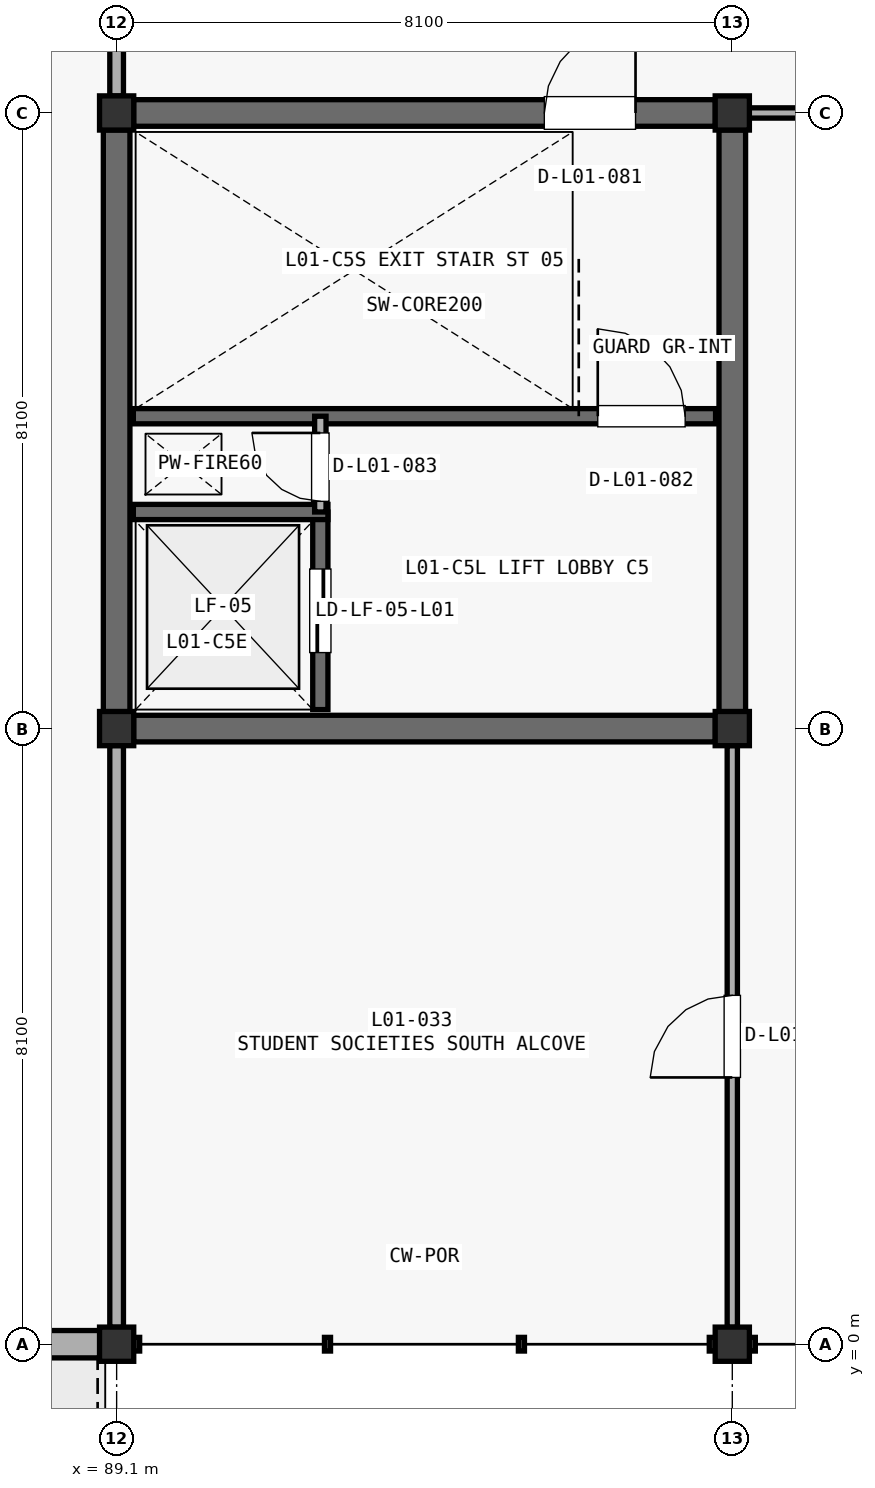
"""IFC4 building model, lengths in metres.
Left out: names, types, materials, properties, quantities, classifications, styles, units other than length and angle.
Written with IfcOpenShell. Run it as: python <this file> out.ifc"""

import sys

from ifc_helpers import new_model, si_unit, direction, frame, frame_2d, origin, origin_2d, place, context, subcontext, project, spatial, rectangle, extrude, element, fill, save


model = new_model("IFC4")
c1 = context("Model", 3, precision=1e-05, world=origin(), true_north=direction((0.0, 1.0)))
c2 = subcontext(c1, "Body", "Model", "MODEL_VIEW")
j1 = project(units=[si_unit("LENGTHUNIT", "METRE"), si_unit("PLANEANGLEUNIT", "RADIAN")], contexts=[c1])
p1 = place(None, origin())
s1 = spatial("IfcSite", under=j1, at=p1, CompositionType="ELEMENT")
p2 = place(p1, origin())
s2 = spatial("IfcBuilding", under=s1, at=p2, CompositionType="ELEMENT")
p3 = place(p2, frame((0.0, 0.0, 5.1)))
s3 = spatial("IfcBuildingStorey", under=s2, at=p3, CompositionType="ELEMENT", Elevation=5.1)
for number, where, z_axis, x_axis in (
    (1, (89.1, 0.0, 0.0), (0.0, 0.0, 1.0), (1.0, 0.0, 0.0)),
    (2, (89.1, 8.1, 0.0), (0.0, 0.0, 1.0), (1.0, 0.0, 0.0)),
    (3, (89.1, 16.2, 0.0), (0.0, 0.0, 1.0), (1.0, 0.0, 0.0)),
    (4, (97.2, 0.0, 0.0), (0.0, 0.0, 1.0), (1.0, 0.0, 0.0)),
    (5, (97.2, 8.1, 0.0), (0.0, 0.0, 1.0), (1.0, 0.0, 0.0)),
    (6, (97.2, 16.2, 0.0), (0.0, 0.0, 1.0), (1.0, 0.0, 0.0)),
):
    element("IfcColumn", number, at=place(p3, frame(where, z_axis=z_axis, x_axis=x_axis)), inside=s3, PredefinedType="COLUMN", context=c2, shape_type="SweptSolid", body=[
        extrude(rectangle(XDim=0.45, YDim=0.45, at=origin_2d()), origin(), (0.0, 0.0, 1.0), 4.59),
    ])
p4 = place(p3, frame((81.298, 0.0, 0.0), z_axis=(0.0, 0.0, 1.0), x_axis=(1.0, 0.0, 0.0)))
e7 = element("IfcWall", 7, at=p4, inside=s3, PredefinedType="STANDARD", context=c2, shape_type="SweptSolid", body=[
    extrude(rectangle(XDim=7.579, YDim=0.36, at=frame_2d((3.79, 0.0))), origin(), (0.0, 0.0, 1.0), 3.849),
])
p5 = place(p4, frame((4.689, 0.0, 0.0), z_axis=(0.0, 0.0, 1.0), x_axis=(-1.0, 0.0, 0.0)))
e8 = element("IfcOpeningElement", 8, at=p5, cuts=e7, PredefinedType="OPENING", context=c2, shape_type="SweptSolid", body=[
    extrude(rectangle(XDim=1.8, YDim=2.2, at=frame_2d((0.9, 1.1))), frame((0.0, 0.19, 0.0), z_axis=(0.0, -1.0, 0.0), x_axis=(1.0, 0.0, 0.0)), (0.0, 0.0, 1.0), 0.38),
])
p6 = place(p3, frame((89.323, 16.2, 0.0), z_axis=(0.0, 0.0, 1.0), x_axis=(1.0, 0.0, 0.0)))
e9 = element("IfcWall", 9, at=p6, inside=s3, PredefinedType="SHEAR", context=c2, shape_type="SweptSolid", body=[
    extrude(rectangle(XDim=7.654, YDim=0.35, at=frame_2d((3.827, 0.0))), origin(), (0.0, 0.0, 1.0), 4.312),
])
p7 = place(p6, frame((5.404, 0.0, 0.0)))
e10 = element("IfcOpeningElement", 10, at=p7, cuts=e9, PredefinedType="OPENING", context=c2, shape_type="SweptSolid", body=[
    extrude(rectangle(XDim=1.2, YDim=2.2, at=frame_2d((0.6, 1.1))), frame((0.0, 0.185, 0.0), z_axis=(0.0, -1.0, 0.0), x_axis=(1.0, 0.0, 0.0)), (0.0, 0.0, 1.0), 0.37),
])
for number, where, z_axis, x_axis in (
    (11, (89.1, 8.323, 0.0), (0.0, 0.0, 1.0), (0.0, 1.0, 0.0)),
    (12, (97.2, 8.323, 0.0), (0.0, 0.0, 1.0), (0.0, 1.0, 0.0)),
    (13, (89.323, 8.1, 0.0), (0.0, 0.0, 1.0), (1.0, 0.0, 0.0)),
):
    element("IfcWall", number, at=place(p3, frame(where, z_axis=z_axis, x_axis=x_axis)), inside=s3, PredefinedType="SHEAR", context=c2, shape_type="SweptSolid", body=[
        extrude(rectangle(XDim=7.654, YDim=0.35, at=frame_2d((3.827, 0.0))), origin(), (0.0, 0.0, 1.0), 4.312),
    ])
p8 = place(p3, frame((89.32, 12.21, 0.0), z_axis=(0.0, 0.0, 1.0), x_axis=(1.0, 0.0, 0.0)))
e14 = element("IfcWall", 14, at=p8, inside=s3, PredefinedType="SHEAR", context=c2, shape_type="SweptSolid", body=[
    extrude(rectangle(XDim=7.66, YDim=0.2, at=frame_2d((3.83, 0.0))), origin(), (0.0, 0.0, 1.0), 4.312),
])
p9 = place(p8, frame((6.11, 0.0, 0.0)))
e15 = element("IfcOpeningElement", 15, at=p9, cuts=e14, PredefinedType="OPENING", context=c2, shape_type="SweptSolid", body=[
    extrude(rectangle(XDim=1.15, YDim=2.2, at=frame_2d((0.575, 1.1))), frame((0.0, 0.11, 0.0), z_axis=(0.0, -1.0, 0.0), x_axis=(1.0, 0.0, 0.0)), (0.0, 0.0, 1.0), 0.22),
])
p10 = place(p3, frame((91.78, 8.35, 0.0), z_axis=(0.0, 0.0, 1.0), x_axis=(0.0, 1.0, 0.0)))
e16 = element("IfcWall", 16, at=p10, inside=s3, PredefinedType="SHEAR", context=c2, shape_type="SweptSolid", body=[
    extrude(rectangle(XDim=2.6, YDim=0.2, at=frame_2d((1.3, 0.0))), origin(), (0.0, 0.0, 1.0), 4.312),
])
p11 = place(p10, frame((0.75, 0.0, 0.0)))
e17 = element("IfcOpeningElement", 17, at=p11, cuts=e16, PredefinedType="OPENING", context=c2, shape_type="SweptSolid", body=[
    extrude(rectangle(XDim=1.1, YDim=2.2, at=frame_2d((0.55, 1.1))), frame((0.0, 0.11, 0.0), z_axis=(0.0, -1.0, 0.0), x_axis=(1.0, 0.0, 0.0)), (0.0, 0.0, 1.0), 0.22),
])
p12 = place(p3, frame((89.32, 10.95, 0.0), z_axis=(0.0, 0.0, 1.0), x_axis=(1.0, 0.0, 0.0)))
e18 = element("IfcWall", 18, at=p12, inside=s3, PredefinedType="SHEAR", context=c2, shape_type="SweptSolid", body=[
    extrude(rectangle(XDim=2.56, YDim=0.2, at=frame_2d((1.28, 0.0))), origin(), (0.0, 0.0, 1.0), 4.312),
])
p13 = place(p3, frame((91.78, 10.95, 0.0), z_axis=(0.0, 0.0, 1.0), x_axis=(0.0, 1.0, 0.0)))
e19 = element("IfcWall", 19, at=p13, inside=s3, PredefinedType="PARTITIONING", context=c2, shape_type="SweptSolid", body=[
    extrude(rectangle(XDim=1.26, YDim=0.15, at=frame_2d((0.63, 0.0))), origin(), (0.0, 0.0, 1.0), 4.312),
])
p14 = place(p13, frame((0.14, 0.0, 0.0)))
e20 = element("IfcOpeningElement", 20, at=p14, cuts=e19, PredefinedType="OPENING", context=c2, shape_type="SweptSolid", body=[
    extrude(rectangle(XDim=0.9, YDim=2.15, at=frame_2d((0.45, 1.075))), frame((0.0, 0.085, 0.0), z_axis=(0.0, -1.0, 0.0), x_axis=(1.0, 0.0, 0.0)), (0.0, 0.0, 1.0), 0.17),
])
p15 = place(p3, frame((97.423, 16.2, 0.0), z_axis=(0.0, 0.0, 1.0), x_axis=(1.0, 0.0, 0.0)))
e21 = element("IfcWall", 21, at=p15, inside=s3, PredefinedType="PARTITIONING", context=c2, shape_type="SweptSolid", body=[
    extrude(rectangle(XDim=7.579, YDim=0.135, at=frame_2d((3.79, 0.0))), origin(), (0.0, 0.0, 1.0), 4.006),
])
p16 = place(p15, frame((3.314, 0.0, 0.0)))
e22 = element("IfcOpeningElement", 22, at=p16, cuts=e21, PredefinedType="OPENING", context=c2, shape_type="SweptSolid", body=[
    extrude(rectangle(XDim=0.95, YDim=2.15, at=frame_2d((0.475, 1.075))), frame((0.0, 0.078, 0.0), z_axis=(0.0, -1.0, 0.0), x_axis=(1.0, 0.0, 0.0)), (0.0, 0.0, 1.0), 0.155),
])
p17 = place(p3, frame((97.2, 0.223, 0.0), z_axis=(0.0, 0.0, 1.0), x_axis=(0.0, 1.0, 0.0)))
e23 = element("IfcWall", 23, at=p17, inside=s3, PredefinedType="PARTITIONING", context=c2, shape_type="SweptSolid", body=[
    extrude(rectangle(XDim=7.654, YDim=0.135, at=frame_2d((3.827, 0.0))), origin(), (0.0, 0.0, 1.0), 3.902),
])
p18 = place(p17, frame((3.287, 0.0, 0.0)))
e24 = element("IfcOpeningElement", 24, at=p18, cuts=e23, PredefinedType="OPENING", context=c2, shape_type="SweptSolid", body=[
    extrude(rectangle(XDim=1.08, YDim=2.15, at=frame_2d((0.54, 1.075))), frame((0.0, 0.078, 0.0), z_axis=(0.0, -1.0, 0.0), x_axis=(1.0, 0.0, 0.0)), (0.0, 0.0, 1.0), 0.155),
])
p19 = place(p3, frame((89.1, 0.223, 0.0), z_axis=(0.0, 0.0, 1.0), x_axis=(0.0, 1.0, 0.0)))
e25 = element("IfcWall", 25, at=p19, inside=s3, PredefinedType="PARTITIONING", context=c2, shape_type="SweptSolid", body=[
    extrude(rectangle(XDim=7.654, YDim=0.18, at=frame_2d((3.827, 0.0))), origin(), (0.0, 0.0, 1.0), 3.852),
])
p20 = place(p3, frame((89.1, 16.423, 0.0), z_axis=(0.0, 0.0, 1.0), x_axis=(0.0, 1.0, 0.0)))
e26 = element("IfcWall", 26, at=p20, inside=s3, PredefinedType="PARTITIONING", context=c2, shape_type="SweptSolid", body=[
    extrude(rectangle(XDim=7.654, YDim=0.18, at=frame_2d((3.827, 0.0))), origin(), (0.0, 0.0, 1.0), 3.954),
])
p21 = place(p7, origin())
e27 = element("IfcDoor", 27, at=p21, inside=s3, OperationType="SINGLE_SWING_RIGHT", PredefinedType="DOOR", context=c2, shape_type="SweptSolid", body=[
    extrude(rectangle(XDim=1.2, YDim=2.2, at=frame_2d((0.6, 1.1))), frame((0.0, 0.025, 0.0), z_axis=(0.0, -1.0, 0.0), x_axis=(1.0, 0.0, 0.0)), (0.0, 0.0, 1.0), 0.05),
])
fill(e10, e27)
p22 = place(p9, origin())
e28 = element("IfcDoor", 28, at=p22, inside=s3, OperationType="SINGLE_SWING_LEFT", PredefinedType="DOOR", context=c2, shape_type="SweptSolid", body=[
    extrude(rectangle(XDim=1.15, YDim=2.2, at=frame_2d((0.575, 1.1))), frame((0.0, 0.025, 0.0), z_axis=(0.0, -1.0, 0.0), x_axis=(1.0, 0.0, 0.0)), (0.0, 0.0, 1.0), 0.05),
])
fill(e15, e28)
p23 = place(p11, origin())
e29 = element("IfcDoor", 29, at=p23, inside=s3, OperationType="SLIDING_TO_LEFT", PredefinedType="DOOR", context=c2, shape_type="SweptSolid", body=[
    extrude(rectangle(XDim=1.1, YDim=2.2, at=frame_2d((0.55, 1.1))), frame((0.0, 0.025, 0.0), z_axis=(0.0, -1.0, 0.0), x_axis=(1.0, 0.0, 0.0)), (0.0, 0.0, 1.0), 0.05),
])
fill(e17, e29)
p24 = place(p14, origin())
e30 = element("IfcDoor", 30, at=p24, inside=s3, OperationType="SINGLE_SWING_RIGHT", PredefinedType="DOOR", context=c2, shape_type="SweptSolid", body=[
    extrude(rectangle(XDim=0.9, YDim=2.15, at=frame_2d((0.45, 1.075))), frame((0.0, 0.025, 0.0), z_axis=(0.0, -1.0, 0.0), x_axis=(1.0, 0.0, 0.0)), (0.0, 0.0, 1.0), 0.05),
])
fill(e20, e30)
p25 = place(p18, origin())
e31 = element("IfcDoor", 31, at=p25, inside=s3, OperationType="SINGLE_SWING_LEFT", PredefinedType="DOOR", context=c2, shape_type="SweptSolid", body=[
    extrude(rectangle(XDim=1.08, YDim=2.15, at=frame_2d((0.54, 1.075))), frame((0.0, 0.025, 0.0), z_axis=(0.0, -1.0, 0.0), x_axis=(1.0, 0.0, 0.0)), (0.0, 0.0, 1.0), 0.05),
])
fill(e24, e31)
save(model, sys.argv[1])
